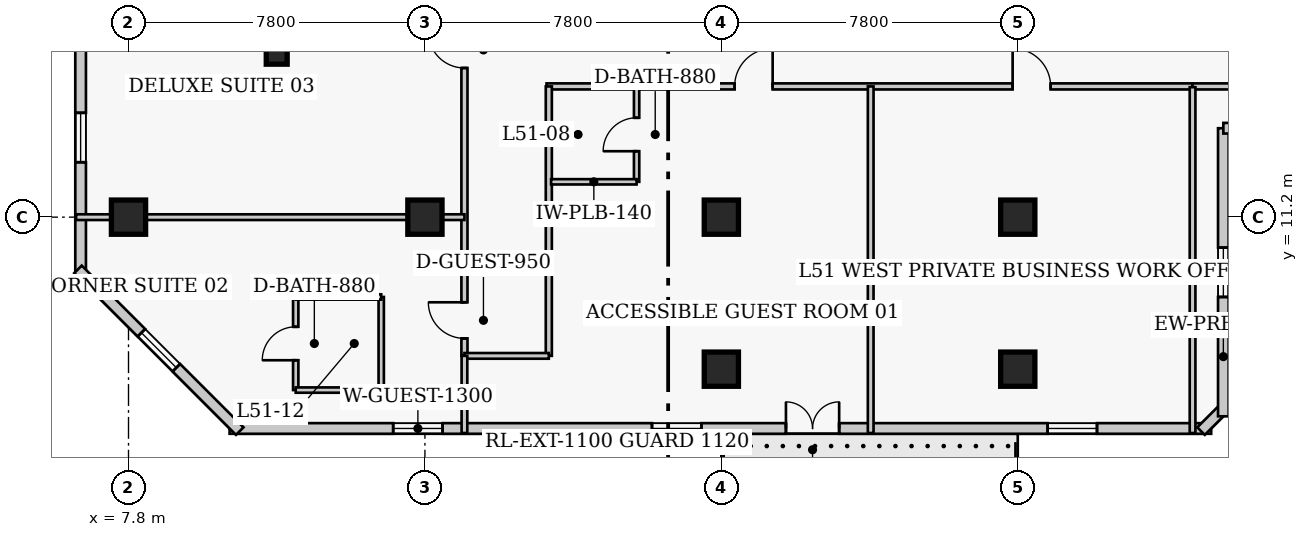
"""IFC4 building model, lengths in metres.
Left out: names, types, materials, properties, quantities, classifications, styles, units other than length and angle.
Written with IfcOpenShell. Run it as: python <this file> out.ifc"""

import sys

from ifc_helpers import new_model, si_unit, direction, frame, frame_2d, origin, origin_2d, place, context, subcontext, project, spatial, rectangle, extrude, element, fill, save


model = new_model("IFC4")
c1 = context("Model", 3, precision=1e-05, world=origin(), true_north=direction((0.0, 1.0)))
c2 = subcontext(c1, "Body", "Model", "MODEL_VIEW")
j1 = project(units=[si_unit("LENGTHUNIT", "METRE"), si_unit("PLANEANGLEUNIT", "RADIAN")], contexts=[c1])
p1 = place(None, origin())
s1 = spatial("IfcSite", under=j1, at=p1, CompositionType="ELEMENT")
p2 = place(p1, origin())
s2 = spatial("IfcBuilding", under=s1, at=p2, CompositionType="ELEMENT")
p3 = place(p2, frame((0.0, 0.0, 204.6)))
s3 = spatial("IfcBuildingStorey", under=s2, at=p3, CompositionType="ELEMENT", Elevation=204.6)
for number, where, z_axis, x_axis in (
    (1, (7.8, 11.2, 0.0), (0.0, 0.0, 1.0), (1.0, 0.0, 0.0)),
    (2, (15.6, 11.2, 0.0), (0.0, 0.0, 1.0), (1.0, 0.0, 0.0)),
    (3, (23.4, 11.2, 0.0), (0.0, 0.0, 1.0), (1.0, 0.0, 0.0)),
    (4, (31.2, 11.2, 0.0), (0.0, 0.0, 1.0), (1.0, 0.0, 0.0)),
    (5, (23.4, 7.2, 0.0), (0.0, 0.0, 1.0), (1.0, 0.0, 0.0)),
    (6, (31.2, 7.2, 0.0), (0.0, 0.0, 1.0), (1.0, 0.0, 0.0)),
):
    element("IfcColumn", number, at=place(p3, frame(where, z_axis=z_axis, x_axis=x_axis)), inside=s3, PredefinedType="COLUMN", context=c2, shape_type="SweptSolid", body=[
        extrude(rectangle(XDim=0.9, YDim=0.9, at=origin_2d()), origin(), (0.0, 0.0, 1.0), 3.9),
    ])
p4 = place(p3, frame((11.7, 15.6, 0.0), z_axis=(0.0, 0.0, 1.0), x_axis=(1.0, 0.0, 0.0)))
e7 = element("IfcColumn", 7, at=p4, inside=s3, PredefinedType="PILASTER", context=c2, shape_type="SweptSolid", body=[
    extrude(rectangle(XDim=0.55, YDim=0.75, at=origin_2d()), origin(), (0.0, 0.0, 1.0), 3.9),
])
p5 = place(p3, frame((10.46, 5.64, 0.0), z_axis=(0.0, 0.0, 1.0), x_axis=(1.0, 0.0, 0.0)))
e8 = element("IfcWall", 8, at=p5, inside=s3, PredefinedType="SOLIDWALL", context=c2, shape_type="SweptSolid", body=[
    extrude(rectangle(XDim=25.83, YDim=0.28, at=frame_2d((12.915, 0.0))), origin(), (0.0, 0.0, 1.0), 3.65),
])
p6 = place(p5, frame((14.64, 0.0, 0.0)))
e9 = element("IfcOpeningElement", 9, at=p6, cuts=e8, PredefinedType="OPENING", context=c2, shape_type="SweptSolid", body=[
    extrude(rectangle(XDim=1.4, YDim=2.15, at=frame_2d((0.7, 1.075))), frame((0.0, 0.15, 0.0), z_axis=(0.0, -1.0, 0.0), x_axis=(1.0, 0.0, 0.0)), (0.0, 0.0, 1.0), 0.3),
])
p7 = place(p5, frame((4.305, 0.0, 0.85)))
e10 = element("IfcOpeningElement", 10, at=p7, cuts=e8, PredefinedType="OPENING", context=c2, shape_type="SweptSolid", body=[
    extrude(rectangle(XDim=1.3, YDim=1.7, at=frame_2d((0.65, 0.85))), frame((0.0, 0.15, 0.0), z_axis=(0.0, -1.0, 0.0), x_axis=(1.0, 0.0, 0.0)), (0.0, 0.0, 1.0), 0.3),
])
p8 = place(p5, frame((11.115, 0.0, 0.85)))
e11 = element("IfcOpeningElement", 11, at=p8, cuts=e8, PredefinedType="OPENING", context=c2, shape_type="SweptSolid", body=[
    extrude(rectangle(XDim=1.3, YDim=1.7, at=frame_2d((0.65, 0.85))), frame((0.0, 0.15, 0.0), z_axis=(0.0, -1.0, 0.0), x_axis=(1.0, 0.0, 0.0)), (0.0, 0.0, 1.0), 0.3),
])
p9 = place(p5, frame((21.525, 0.0, 0.85)))
e12 = element("IfcOpeningElement", 12, at=p9, cuts=e8, PredefinedType="OPENING", context=c2, shape_type="SweptSolid", body=[
    extrude(rectangle(XDim=1.3, YDim=1.7, at=frame_2d((0.65, 0.85))), frame((0.0, 0.15, 0.0), z_axis=(0.0, -1.0, 0.0), x_axis=(1.0, 0.0, 0.0)), (0.0, 0.0, 1.0), 0.3),
])
p10 = place(p3, frame((36.023, 5.571, 0.0), z_axis=(0.0, 0.0, 1.0), x_axis=(0.707106781187, 0.707106781187, 0.0)))
e13 = element("IfcWall", 13, at=p10, inside=s3, PredefinedType="SOLIDWALL", context=c2, shape_type="SweptSolid", body=[
    extrude(rectangle(XDim=0.928, YDim=0.28, at=frame_2d((0.464, 0.0))), origin(), (0.0, 0.0, 1.0), 3.65),
])
p11 = place(p3, frame((36.61, 5.96, 0.0), z_axis=(0.0, 0.0, 1.0), x_axis=(0.0, 1.0, 0.0)))
e14 = element("IfcWall", 14, at=p11, inside=s3, PredefinedType="SOLIDWALL", context=c2, shape_type="SweptSolid", body=[
    extrude(rectangle(XDim=7.58, YDim=0.28, at=frame_2d((3.79, 0.0))), origin(), (0.0, 0.0, 1.0), 3.65),
])
p12 = place(p11, frame((3.14, 0.0, 0.85)))
e15 = element("IfcOpeningElement", 15, at=p12, cuts=e14, PredefinedType="OPENING", context=c2, shape_type="SweptSolid", body=[
    extrude(rectangle(XDim=1.3, YDim=1.7, at=frame_2d((0.65, 0.85))), frame((0.0, 0.15, 0.0), z_axis=(0.0, -1.0, 0.0), x_axis=(1.0, 0.0, 0.0)), (0.0, 0.0, 1.0), 0.3),
])
p13 = place(p3, frame((36.61, 13.54, 0.0), z_axis=(0.0, 0.0, 1.0), x_axis=(1.0, 0.0, 0.0)))
e16 = element("IfcWall", 16, at=p13, inside=s3, PredefinedType="SOLIDWALL", context=c2, shape_type="SweptSolid", body=[
    extrude(rectangle(XDim=4.78, YDim=0.28, at=frame_2d((2.39, 0.0))), origin(), (0.0, 0.0, 1.0), 3.65),
])
p14 = place(p13, frame((1.74, 0.0, 0.85)))
e17 = element("IfcOpeningElement", 17, at=p14, cuts=e16, PredefinedType="OPENING", context=c2, shape_type="SweptSolid", body=[
    extrude(rectangle(XDim=1.3, YDim=1.7, at=frame_2d((0.65, 0.85))), frame((0.0, 0.15, 0.0), z_axis=(0.0, -1.0, 0.0), x_axis=(1.0, 0.0, 0.0)), (0.0, 0.0, 1.0), 0.3),
])
p15 = place(p3, frame((6.54, 39.44, 0.0), z_axis=(0.0, 0.0, 1.0), x_axis=(0.0, -1.0, 0.0)))
e18 = element("IfcWall", 18, at=p15, inside=s3, PredefinedType="SOLIDWALL", context=c2, shape_type="SweptSolid", body=[
    extrude(rectangle(XDim=29.88, YDim=0.28, at=frame_2d((14.94, 0.0))), origin(), (0.0, 0.0, 1.0), 3.65),
])
p16 = place(p15, frame((2.435, 0.0, 0.85)))
e19 = element("IfcOpeningElement", 19, at=p16, cuts=e18, PredefinedType="OPENING", context=c2, shape_type="SweptSolid", body=[
    extrude(rectangle(XDim=1.3, YDim=1.7, at=frame_2d((0.65, 0.85))), frame((0.0, 0.15, 0.0), z_axis=(0.0, -1.0, 0.0), x_axis=(1.0, 0.0, 0.0)), (0.0, 0.0, 1.0), 0.3),
])
p17 = place(p15, frame((11.205, 0.0, 0.85)))
e20 = element("IfcOpeningElement", 20, at=p17, cuts=e18, PredefinedType="OPENING", context=c2, shape_type="SweptSolid", body=[
    extrude(rectangle(XDim=1.3, YDim=1.7, at=frame_2d((0.65, 0.85))), frame((0.0, 0.15, 0.0), z_axis=(0.0, -1.0, 0.0), x_axis=(1.0, 0.0, 0.0)), (0.0, 0.0, 1.0), 0.3),
])
p18 = place(p15, frame((17.375, 0.0, 0.85)))
e21 = element("IfcOpeningElement", 21, at=p18, cuts=e18, PredefinedType="OPENING", context=c2, shape_type="SweptSolid", body=[
    extrude(rectangle(XDim=1.3, YDim=1.7, at=frame_2d((0.65, 0.85))), frame((0.0, 0.15, 0.0), z_axis=(0.0, -1.0, 0.0), x_axis=(1.0, 0.0, 0.0)), (0.0, 0.0, 1.0), 0.3),
])
p19 = place(p15, frame((25.495, 0.0, 0.85)))
e22 = element("IfcOpeningElement", 22, at=p19, cuts=e18, PredefinedType="OPENING", context=c2, shape_type="SweptSolid", body=[
    extrude(rectangle(XDim=1.3, YDim=1.7, at=frame_2d((0.65, 0.85))), frame((0.0, 0.15, 0.0), z_axis=(0.0, -1.0, 0.0), x_axis=(1.0, 0.0, 0.0)), (0.0, 0.0, 1.0), 0.3),
])
p20 = place(p3, frame((6.471, 9.827, 0.0), z_axis=(0.0, 0.0, 1.0), x_axis=(0.707106781187, -0.707106781187, 0.0)))
e23 = element("IfcWall", 23, at=p20, inside=s3, PredefinedType="SOLIDWALL", context=c2, shape_type="SweptSolid", body=[
    extrude(rectangle(XDim=6.02, YDim=0.28, at=frame_2d((3.01, 0.0))), origin(), (0.0, 0.0, 1.0), 3.65),
])
p21 = place(p20, frame((2.36, 0.0, 0.85)))
e24 = element("IfcOpeningElement", 24, at=p21, cuts=e23, PredefinedType="OPENING", context=c2, shape_type="SweptSolid", body=[
    extrude(rectangle(XDim=1.3, YDim=1.7, at=frame_2d((0.65, 0.85))), frame((0.0, 0.15, 0.0), z_axis=(0.0, -1.0, 0.0), x_axis=(1.0, 0.0, 0.0)), (0.0, 0.0, 1.0), 0.3),
])
p22 = place(p3, frame((18.8, 14.64, 0.0), z_axis=(0.0, 0.0, 1.0), x_axis=(1.0, 0.0, 0.0)))
e25 = element("IfcWall", 25, at=p22, inside=s3, PredefinedType="PARTITIONING", context=c2, shape_type="SweptSolid", body=[
    extrude(rectangle(XDim=17.0, YDim=0.16, at=frame_2d((8.5, 0.0))), origin(), (0.0, 0.0, 1.0), 3.65),
])
p23 = place(p22, frame((4.95, 0.0, 0.0)))
e26 = element("IfcOpeningElement", 26, at=p23, cuts=e25, PredefinedType="OPENING", context=c2, shape_type="SweptSolid", body=[
    extrude(rectangle(XDim=1.0, YDim=2.15, at=frame_2d((0.5, 1.075))), frame((0.0, 0.09, 0.0), z_axis=(0.0, -1.0, 0.0), x_axis=(1.0, 0.0, 0.0)), (0.0, 0.0, 1.0), 0.18),
])
p24 = place(p22, frame((12.265, 0.0, 0.0)))
e27 = element("IfcOpeningElement", 27, at=p24, cuts=e25, PredefinedType="OPENING", context=c2, shape_type="SweptSolid", body=[
    extrude(rectangle(XDim=1.0, YDim=2.15, at=frame_2d((0.5, 1.075))), frame((0.0, 0.09, 0.0), z_axis=(0.0, -1.0, 0.0), x_axis=(1.0, 0.0, 0.0)), (0.0, 0.0, 1.0), 0.18),
])
p25 = place(p3, frame((35.8, 14.64, 0.0), z_axis=(0.0, 0.0, 1.0), x_axis=(1.0, 0.0, 0.0)))
e28 = element("IfcWall", 28, at=p25, inside=s3, PredefinedType="PARTITIONING", context=c2, shape_type="SweptSolid", body=[
    extrude(rectangle(XDim=22.85, YDim=0.16, at=frame_2d((11.425, 0.0))), origin(), (0.0, 0.0, 1.0), 3.65),
])
p26 = place(p25, frame((5.748, 0.0, 0.0)))
e29 = element("IfcOpeningElement", 29, at=p26, cuts=e28, PredefinedType="OPENING", context=c2, shape_type="SweptSolid", body=[
    extrude(rectangle(XDim=1.0, YDim=2.15, at=frame_2d((0.5, 1.075))), frame((0.0, 0.09, 0.0), z_axis=(0.0, -1.0, 0.0), x_axis=(1.0, 0.0, 0.0)), (0.0, 0.0, 1.0), 0.18),
])
p27 = place(p3, frame((16.64, 7.55, 0.0), z_axis=(0.0, 0.0, 1.0), x_axis=(0.0, 1.0, 0.0)))
e30 = element("IfcWall", 30, at=p27, inside=s3, PredefinedType="PARTITIONING", context=c2, shape_type="SweptSolid", body=[
    extrude(rectangle(XDim=33.1, YDim=0.16, at=frame_2d((16.55, 0.0))), origin(), (0.0, 0.0, 1.0), 3.65),
])
p28 = place(p27, frame((0.46, 0.0, 0.0)))
e31 = element("IfcOpeningElement", 31, at=p28, cuts=e30, PredefinedType="OPENING", context=c2, shape_type="SweptSolid", body=[
    extrude(rectangle(XDim=0.95, YDim=2.1, at=frame_2d((0.475, 1.05))), frame((0.0, 0.09, 0.0), z_axis=(0.0, -1.0, 0.0), x_axis=(1.0, 0.0, 0.0)), (0.0, 0.0, 1.0), 0.18),
])
p29 = place(p27, frame((7.575, 0.0, 0.0)))
e32 = element("IfcOpeningElement", 32, at=p29, cuts=e30, PredefinedType="OPENING", context=c2, shape_type="SweptSolid", body=[
    extrude(rectangle(XDim=0.95, YDim=2.1, at=frame_2d((0.475, 1.05))), frame((0.0, 0.09, 0.0), z_axis=(0.0, -1.0, 0.0), x_axis=(1.0, 0.0, 0.0)), (0.0, 0.0, 1.0), 0.18),
])
p30 = place(p27, frame((14.178, 0.0, 0.0)))
e33 = element("IfcOpeningElement", 33, at=p30, cuts=e30, PredefinedType="OPENING", context=c2, shape_type="SweptSolid", body=[
    extrude(rectangle(XDim=0.95, YDim=2.1, at=frame_2d((0.475, 1.05))), frame((0.0, 0.09, 0.0), z_axis=(0.0, -1.0, 0.0), x_axis=(1.0, 0.0, 0.0)), (0.0, 0.0, 1.0), 0.18),
])
p31 = place(p27, frame((28.4, 0.0, 0.0)))
e34 = element("IfcOpeningElement", 34, at=p31, cuts=e30, PredefinedType="OPENING", context=c2, shape_type="SweptSolid", body=[
    extrude(rectangle(XDim=1.0, YDim=2.15, at=frame_2d((0.5, 1.075))), frame((0.0, 0.09, 0.0), z_axis=(0.0, -1.0, 0.0), x_axis=(1.0, 0.0, 0.0)), (0.0, 0.0, 1.0), 0.18),
])
p32 = place(p3, frame((18.86, 7.55, 0.0), z_axis=(0.0, 0.0, 1.0), x_axis=(0.0, 1.0, 0.0)))
e35 = element("IfcWall", 35, at=p32, inside=s3, PredefinedType="PARTITIONING", context=c2, shape_type="SweptSolid", body=[
    extrude(rectangle(XDim=7.09, YDim=0.16, at=frame_2d((3.545, 0.0))), origin(), (0.0, 0.0, 1.0), 3.65),
])
p33 = place(p3, frame((16.64, 7.55, 0.0), z_axis=(0.0, 0.0, 1.0), x_axis=(1.0, 0.0, 0.0)))
e36 = element("IfcWall", 36, at=p33, inside=s3, PredefinedType="PARTITIONING", context=c2, shape_type="SweptSolid", body=[
    extrude(rectangle(XDim=2.22, YDim=0.15, at=frame_2d((1.11, 0.0))), origin(), (0.0, 0.0, 1.0), 3.65),
])
p34 = place(p3, frame((21.17, 12.13, 0.0), z_axis=(0.0, 0.0, 1.0), x_axis=(0.0, 1.0, 0.0)))
e37 = element("IfcWall", 37, at=p34, inside=s3, PredefinedType="PLUMBINGWALL", context=c2, shape_type="SweptSolid", body=[
    extrude(rectangle(XDim=2.49, YDim=0.14, at=frame_2d((1.245, 0.0))), origin(), (0.0, 0.0, 1.0), 3.65),
])
p35 = place(p34, frame((0.805, 0.0, 0.0)))
e38 = element("IfcOpeningElement", 38, at=p35, cuts=e37, PredefinedType="OPENING", context=c2, shape_type="SweptSolid", body=[
    extrude(rectangle(XDim=0.88, YDim=2.05, at=frame_2d((0.44, 1.025))), frame((0.0, 0.08, 0.0), z_axis=(0.0, -1.0, 0.0), x_axis=(1.0, 0.0, 0.0)), (0.0, 0.0, 1.0), 0.16),
])
p36 = place(p3, frame((18.92, 12.13, 0.0), z_axis=(0.0, 0.0, 1.0), x_axis=(1.0, 0.0, 0.0)))
e39 = element("IfcWall", 39, at=p36, inside=s3, PredefinedType="PLUMBINGWALL", context=c2, shape_type="SweptSolid", body=[
    extrude(rectangle(XDim=2.25, YDim=0.14, at=frame_2d((1.125, 0.0))), origin(), (0.0, 0.0, 1.0), 3.65),
])
p37 = place(p3, frame((27.33, 5.52, 0.0), z_axis=(0.0, 0.0, 1.0), x_axis=(0.0, 1.0, 0.0)))
e40 = element("IfcWall", 40, at=p37, inside=s3, PredefinedType="PARTITIONING", context=c2, shape_type="SweptSolid", body=[
    extrude(rectangle(XDim=9.12, YDim=0.15, at=frame_2d((4.56, 0.0))), origin(), (0.0, 0.0, 1.0), 3.246),
])
p38 = place(p3, frame((35.8, 5.52, 0.0), z_axis=(0.0, 0.0, 1.0), x_axis=(0.0, 1.0, 0.0)))
e41 = element("IfcWall", 41, at=p38, inside=s3, PredefinedType="PARTITIONING", context=c2, shape_type="SweptSolid", body=[
    extrude(rectangle(XDim=9.1, YDim=0.15, at=frame_2d((4.55, 0.0))), origin(), (0.0, 0.0, 1.0), 3.65),
])
p39 = place(p3, frame((16.64, 5.52, 0.0), z_axis=(0.0, 0.0, 1.0), x_axis=(0.0, 1.0, 0.0)))
e42 = element("IfcWall", 42, at=p39, inside=s3, PredefinedType="PARTITIONING", context=c2, shape_type="SweptSolid", body=[
    extrude(rectangle(XDim=2.03, YDim=0.15, at=frame_2d((1.015, 0.0))), origin(), (0.0, 0.0, 1.0), 3.65),
])
p40 = place(p3, frame((12.2, 6.65, 0.0), z_axis=(0.0, 0.0, 1.0), x_axis=(0.0, 1.0, 0.0)))
e43 = element("IfcWall", 43, at=p40, inside=s3, PredefinedType="PLUMBINGWALL", context=c2, shape_type="SweptSolid", body=[
    extrude(rectangle(XDim=2.45, YDim=0.14, at=frame_2d((1.225, 0.0))), origin(), (0.0, 0.0, 1.0), 3.65),
])
p41 = place(p40, frame((0.785, 0.0, 0.0)))
e44 = element("IfcOpeningElement", 44, at=p41, cuts=e43, PredefinedType="OPENING", context=c2, shape_type="SweptSolid", body=[
    extrude(rectangle(XDim=0.88, YDim=2.05, at=frame_2d((0.44, 1.025))), frame((0.0, 0.08, 0.0), z_axis=(0.0, -1.0, 0.0), x_axis=(1.0, 0.0, 0.0)), (0.0, 0.0, 1.0), 0.16),
])
p42 = place(p3, frame((14.45, 6.65, 0.0), z_axis=(0.0, 0.0, 1.0), x_axis=(0.0, 1.0, 0.0)))
e45 = element("IfcWall", 45, at=p42, inside=s3, PredefinedType="PLUMBINGWALL", context=c2, shape_type="SweptSolid", body=[
    extrude(rectangle(XDim=2.45, YDim=0.14, at=frame_2d((1.225, 0.0))), origin(), (0.0, 0.0, 1.0), 3.65),
])
for number, where, z_axis, x_axis in (
    (46, (12.2, 6.65, 0.0), (0.0, 0.0, 1.0), (1.0, 0.0, 0.0)),
    (47, (12.2, 9.1, 0.0), (0.0, 0.0, 1.0), (1.0, 0.0, 0.0)),
):
    element("IfcWall", number, at=place(p3, frame(where, z_axis=z_axis, x_axis=x_axis)), inside=s3, PredefinedType="PLUMBINGWALL", context=c2, shape_type="SweptSolid", body=[
        extrude(rectangle(XDim=2.25, YDim=0.14, at=frame_2d((1.125, 0.0))), origin(), (0.0, 0.0, 1.0), 3.65),
    ])
p43 = place(p3, frame((6.42, 11.2, 0.0), z_axis=(0.0, 0.0, 1.0), x_axis=(1.0, 0.0, 0.0)))
e48 = element("IfcWall", 48, at=p43, inside=s3, PredefinedType="PARTITIONING", context=c2, shape_type="SweptSolid", body=[
    extrude(rectangle(XDim=10.22, YDim=0.15, at=frame_2d((5.11, 0.0))), origin(), (0.0, 0.0, 1.0), 2.878),
])
p44 = place(p6, origin())
e49 = element("IfcDoor", 49, at=p44, inside=s3, OperationType="DOUBLE_DOOR_SINGLE_SWING", PredefinedType="DOOR", context=c2, shape_type="SweptSolid", body=[
    extrude(rectangle(XDim=1.4, YDim=2.15, at=frame_2d((0.7, 1.075))), frame((0.0, 0.025, 0.0), z_axis=(0.0, -1.0, 0.0), x_axis=(1.0, 0.0, 0.0)), (0.0, 0.0, 1.0), 0.05),
])
fill(e9, e49)
p45 = place(p7, origin())
e50 = element("IfcWindow", 50, at=p45, inside=s3, PartitioningType="SINGLE_PANEL", PredefinedType="WINDOW", context=c2, shape_type="SweptSolid", body=[
    extrude(rectangle(XDim=1.3, YDim=1.7, at=frame_2d((0.65, 0.85))), frame((0.0, 0.03, 0.0), z_axis=(0.0, -1.0, 0.0), x_axis=(1.0, 0.0, 0.0)), (0.0, 0.0, 1.0), 0.06),
])
fill(e10, e50)
p46 = place(p8, origin())
e51 = element("IfcWindow", 51, at=p46, inside=s3, PartitioningType="SINGLE_PANEL", PredefinedType="WINDOW", context=c2, shape_type="SweptSolid", body=[
    extrude(rectangle(XDim=1.3, YDim=1.7, at=frame_2d((0.65, 0.85))), frame((0.0, 0.03, 0.0), z_axis=(0.0, -1.0, 0.0), x_axis=(1.0, 0.0, 0.0)), (0.0, 0.0, 1.0), 0.06),
])
fill(e11, e51)
p47 = place(p9, origin())
e52 = element("IfcWindow", 52, at=p47, inside=s3, PartitioningType="SINGLE_PANEL", PredefinedType="WINDOW", context=c2, shape_type="SweptSolid", body=[
    extrude(rectangle(XDim=1.3, YDim=1.7, at=frame_2d((0.65, 0.85))), frame((0.0, 0.03, 0.0), z_axis=(0.0, -1.0, 0.0), x_axis=(1.0, 0.0, 0.0)), (0.0, 0.0, 1.0), 0.06),
])
fill(e12, e52)
p48 = place(p12, origin())
e53 = element("IfcWindow", 53, at=p48, inside=s3, PartitioningType="SINGLE_PANEL", PredefinedType="WINDOW", context=c2, shape_type="SweptSolid", body=[
    extrude(rectangle(XDim=1.3, YDim=1.7, at=frame_2d((0.65, 0.85))), frame((0.0, 0.03, 0.0), z_axis=(0.0, -1.0, 0.0), x_axis=(1.0, 0.0, 0.0)), (0.0, 0.0, 1.0), 0.06),
])
fill(e15, e53)
p49 = place(p19, origin())
e54 = element("IfcWindow", 54, at=p49, inside=s3, PartitioningType="SINGLE_PANEL", PredefinedType="WINDOW", context=c2, shape_type="SweptSolid", body=[
    extrude(rectangle(XDim=1.3, YDim=1.7, at=frame_2d((0.65, 0.85))), frame((0.0, 0.03, 0.0), z_axis=(0.0, -1.0, 0.0), x_axis=(1.0, 0.0, 0.0)), (0.0, 0.0, 1.0), 0.06),
])
fill(e22, e54)
p50 = place(p21, origin())
e55 = element("IfcWindow", 55, at=p50, inside=s3, PartitioningType="SINGLE_PANEL", PredefinedType="WINDOW", context=c2, shape_type="SweptSolid", body=[
    extrude(rectangle(XDim=1.3, YDim=1.7, at=frame_2d((0.65, 0.85))), frame((0.0, 0.03, 0.0), z_axis=(0.0, -1.0, 0.0), x_axis=(1.0, 0.0, 0.0)), (0.0, 0.0, 1.0), 0.06),
])
fill(e24, e55)
p51 = place(p35, origin())
e56 = element("IfcDoor", 56, at=p51, inside=s3, OperationType="SINGLE_SWING_LEFT", PredefinedType="DOOR", context=c2, shape_type="SweptSolid", body=[
    extrude(rectangle(XDim=0.88, YDim=2.05, at=frame_2d((0.44, 1.025))), frame((0.0, 0.025, 0.0), z_axis=(0.0, -1.0, 0.0), x_axis=(1.0, 0.0, 0.0)), (0.0, 0.0, 1.0), 0.05),
])
fill(e38, e56)
p52 = place(p23, origin())
e57 = element("IfcDoor", 57, at=p52, inside=s3, OperationType="SINGLE_SWING_RIGHT", PredefinedType="DOOR", context=c2, shape_type="SweptSolid", body=[
    extrude(rectangle(XDim=1.0, YDim=2.15, at=frame_2d((0.5, 1.075))), frame((0.0, 0.025, 0.0), z_axis=(0.0, -1.0, 0.0), x_axis=(1.0, 0.0, 0.0)), (0.0, 0.0, 1.0), 0.05),
])
fill(e26, e57)
p53 = place(p24, origin())
e58 = element("IfcDoor", 58, at=p53, inside=s3, OperationType="SINGLE_SWING_LEFT", PredefinedType="DOOR", context=c2, shape_type="SweptSolid", body=[
    extrude(rectangle(XDim=1.0, YDim=2.15, at=frame_2d((0.5, 1.075))), frame((0.0, 0.025, 0.0), z_axis=(0.0, -1.0, 0.0), x_axis=(1.0, 0.0, 0.0)), (0.0, 0.0, 1.0), 0.05),
])
fill(e27, e58)
p54 = place(p41, origin())
e59 = element("IfcDoor", 59, at=p54, inside=s3, OperationType="SINGLE_SWING_LEFT", PredefinedType="DOOR", context=c2, shape_type="SweptSolid", body=[
    extrude(rectangle(XDim=0.88, YDim=2.05, at=frame_2d((0.44, 1.025))), frame((0.0, 0.025, 0.0), z_axis=(0.0, -1.0, 0.0), x_axis=(1.0, 0.0, 0.0)), (0.0, 0.0, 1.0), 0.05),
])
fill(e44, e59)
p55 = place(p28, origin())
e60 = element("IfcDoor", 60, at=p55, inside=s3, OperationType="SINGLE_SWING_RIGHT", PredefinedType="DOOR", context=c2, shape_type="SweptSolid", body=[
    extrude(rectangle(XDim=0.95, YDim=2.1, at=frame_2d((0.475, 1.05))), frame((0.0, 0.025, 0.0), z_axis=(0.0, -1.0, 0.0), x_axis=(1.0, 0.0, 0.0)), (0.0, 0.0, 1.0), 0.05),
])
fill(e31, e60)
p56 = place(p29, origin())
e61 = element("IfcDoor", 61, at=p56, inside=s3, OperationType="SINGLE_SWING_RIGHT", PredefinedType="DOOR", context=c2, shape_type="SweptSolid", body=[
    extrude(rectangle(XDim=0.95, YDim=2.1, at=frame_2d((0.475, 1.05))), frame((0.0, 0.025, 0.0), z_axis=(0.0, -1.0, 0.0), x_axis=(1.0, 0.0, 0.0)), (0.0, 0.0, 1.0), 0.05),
])
fill(e32, e61)
save(model, sys.argv[1])
